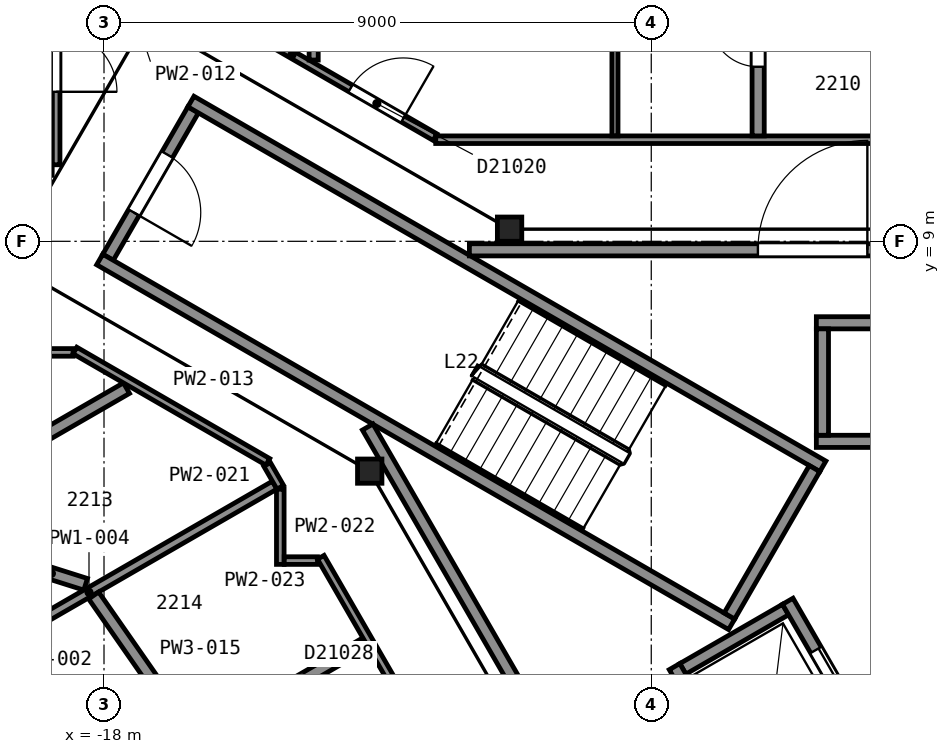
"""IFC4 building model, lengths in metres.
Left out: names, types, materials, properties, quantities, classifications, styles, units other than length and angle.
Written with IfcOpenShell. Run it as: python <this file> out.ifc"""

import sys

from ifc_helpers import new_model, si_unit, direction, frame, frame_2d, origin, origin_2d, place, context, subcontext, project, spatial, rectangle, i_section, extrude, element, fill, save


model = new_model("IFC4")
c1 = context("Model", 3, precision=1e-05, world=origin(), true_north=direction((0.0, 1.0)))
c2 = subcontext(c1, "Body", "Model", "MODEL_VIEW")
j1 = project(units=[si_unit("LENGTHUNIT", "METRE"), si_unit("PLANEANGLEUNIT", "RADIAN")], contexts=[c1])
p1 = place(None, origin())
s1 = spatial("IfcSite", under=j1, at=p1, CompositionType="ELEMENT")
p2 = place(p1, origin())
s2 = spatial("IfcBuilding", under=s1, at=p2, CompositionType="ELEMENT")
p3 = place(p2, frame((0.0, 0.0, 96.4)))
s3 = spatial("IfcBuildingStorey", under=s2, at=p3, CompositionType="ELEMENT", Elevation=96.4)
for number, where, z_axis, x_axis in (
    (1, (-11.33, 9.2, 0.0), (0.0, 0.0, 1.0), (1.0, 0.0, 0.0)),
    (2, (-13.63, 5.22, 0.0), (0.0, 0.0, 1.0), (1.0, 0.0, 0.0)),
):
    element("IfcColumn", number, at=place(p3, frame(where, z_axis=z_axis, x_axis=x_axis)), inside=s3, PredefinedType="COLUMN", context=c2, shape_type="SweptSolid", body=[
        extrude(i_section(OverallWidth=0.401, OverallDepth=0.399, WebThickness=0.025, FlangeThickness=0.04, FilletRadius=0.015, at=origin_2d()), origin(), (0.0, 0.0, 1.0), 3.6),
    ])
p4 = place(p3, frame((-16.534, 11.162, 0.0), z_axis=(0.0, 0.0, 1.0), x_axis=(-0.49998411664, -0.866034573852, 0.0)))
e3 = element("IfcWall", 3, at=p4, inside=s3, PredefinedType="PARTITIONING", context=c2, shape_type="SweptSolid", body=[
    extrude(rectangle(XDim=2.8, YDim=0.2, at=frame_2d((1.4, 0.0))), origin(), (0.0, 0.0, 1.0), 3.35),
])
p5 = place(p4, frame((0.85, 0.0, 0.0)))
e4 = element("IfcOpeningElement", 4, at=p5, cuts=e3, PredefinedType="OPENING", context=c2, shape_type="SweptSolid", body=[
    extrude(rectangle(XDim=1.1, YDim=2.1, at=frame_2d((0.55, 1.05))), frame((0.0, 0.11, 0.0), z_axis=(0.0, -1.0, 0.0), x_axis=(1.0, 0.0, 0.0)), (0.0, 0.0, 1.0), 0.22),
])
for number, where, z_axis, x_axis in (
    (5, (-7.678, 2.701, 0.0), (0.0, 0.0, 1.0), (-0.866, 0.5, 0.0)),
    (6, (-6.178, 5.299, 0.0), (0.0, 0.0, 1.0), (-0.866, 0.5, 0.0)),
):
    element("IfcWall", number, at=place(p3, frame(where, z_axis=z_axis, x_axis=x_axis)), inside=s3, PredefinedType="PARTITIONING", context=c2, shape_type="SweptSolid", body=[
        extrude(rectangle(XDim=12.0, YDim=0.2, at=frame_2d((6.0, 0.0))), origin(), (0.0, 0.0, 1.0), 3.35),
    ])
p6 = place(p3, frame((-6.315, 5.262, 0.0), z_axis=(0.0, 0.0, 1.0), x_axis=(-0.500049511043, -0.865996816683, 0.0)))
e7 = element("IfcWall", 7, at=p6, inside=s3, PredefinedType="PARTITIONING", context=c2, shape_type="SweptSolid", body=[
    extrude(rectangle(XDim=2.8, YDim=0.2, at=frame_2d((1.4, 0.0))), origin(), (0.0, 0.0, 1.0), 3.35),
])
for number, where, z_axis, x_axis in (
    (8, (-6.285, 5.71, 0.0), (0.0, 0.0, 1.0), (1.0, 0.0, 0.0)),
    (9, (-6.285, 7.66, 0.0), (0.0, 0.0, 1.0), (1.0, 0.0, 0.0)),
):
    element("IfcWall", number, at=place(p3, frame(where, z_axis=z_axis, x_axis=x_axis)), inside=s3, PredefinedType="PARTITIONING", context=c2, shape_type="SweptSolid", body=[
        extrude(rectangle(XDim=2.35, YDim=0.2, at=frame_2d((1.175, 0.0))), origin(), (0.0, 0.0, 1.0), 3.6),
    ])
p7 = place(p3, frame((-8.48, 1.969, 0.0), z_axis=(0.0, 0.0, 1.0), x_axis=(0.866000020948, 0.500043961785, 0.0)))
e10 = element("IfcWall", 10, at=p7, inside=s3, PredefinedType="PARTITIONING", context=c2, shape_type="SweptSolid", body=[
    extrude(rectangle(XDim=1.95, YDim=0.2, at=frame_2d((0.975, 0.0))), origin(), (0.0, 0.0, 1.0), 3.6),
])
p8 = place(p3, frame((-6.185, 5.81, 0.0), z_axis=(0.0, 0.0, 1.0), x_axis=(0.0, 1.0, 0.0)))
e11 = element("IfcWall", 11, at=p8, inside=s3, PredefinedType="PARTITIONING", context=c2, shape_type="SweptSolid", body=[
    extrude(rectangle(XDim=1.75, YDim=0.2, at=frame_2d((0.875, 0.0))), origin(), (0.0, 0.0, 1.0), 3.6),
])
p9 = place(p3, frame((-5.28, 0.525, 0.0), z_axis=(0.0, 0.0, 1.0), x_axis=(-0.500037662692, 0.866003658127, 0.0)))
e12 = element("IfcWall", 12, at=p9, inside=s3, PredefinedType="PARTITIONING", context=c2, shape_type="SweptSolid", body=[
    extrude(rectangle(XDim=2.95, YDim=0.2, at=frame_2d((1.475, 0.0))), origin(), (0.0, 0.0, 1.0), 3.6),
])
p10 = place(p9, frame((0.925, 0.0, 0.0)))
e13 = element("IfcOpeningElement", 13, at=p10, cuts=e12, PredefinedType="OPENING", context=c2, shape_type="SweptSolid", body=[
    extrude(rectangle(XDim=1.1, YDim=2.1, at=frame_2d((0.55, 1.05))), frame((0.0, 0.11, 0.0), z_axis=(0.0, -1.0, 0.0), x_axis=(1.0, 0.0, 0.0)), (0.0, 0.0, 1.0), 0.22),
])
p11 = place(p3, frame((-7.242, -0.376, 0.0), z_axis=(0.0, 0.0, 1.0), x_axis=(-0.499996545922, 0.866027397988, 0.0)))
e14 = element("IfcWall", 14, at=p11, inside=s3, PredefinedType="PARTITIONING", context=c2, shape_type="SweptSolid", body=[
    extrude(rectangle(XDim=2.75, YDim=0.2, at=frame_2d((1.375, 0.0))), origin(), (0.0, 0.0, 1.0), 3.6),
])
p12 = place(p3, frame((-13.664, 5.946, 0.0), z_axis=(0.0, 0.0, 1.0), x_axis=(0.499994327219, -0.866028678941, 0.0)))
e15 = element("IfcWall", 15, at=p12, inside=s3, PredefinedType="PARTITIONING", context=c2, shape_type="SweptSolid", body=[
    extrude(rectangle(XDim=23.968, YDim=0.2, at=frame_2d((11.984, 0.0))), origin(), (0.0, 0.0, 1.0), 3.35),
])
p13 = place(p3, frame((0.263, 8.86, 0.0), z_axis=(0.0, 0.0, 1.0), x_axis=(-1.0, 0.0, 0.0)))
e16 = element("IfcWall", 16, at=p13, inside=s3, PredefinedType="PARTITIONING", context=c2, shape_type="SweptSolid", body=[
    extrude(rectangle(XDim=12.254, YDim=0.2, at=frame_2d((6.127, 0.0))), origin(), (0.0, 0.0, 1.0), 3.35),
])
p14 = place(p13, frame((5.709, 0.0, 0.0)))
e17 = element("IfcOpeningElement", 17, at=p14, cuts=e16, PredefinedType="OPENING", context=c2, shape_type="SweptSolid", body=[
    extrude(rectangle(XDim=1.8, YDim=2.1, at=frame_2d((0.9, 1.05))), frame((0.0, 0.11, 0.0), z_axis=(0.0, -1.0, 0.0), x_axis=(1.0, 0.0, 0.0)), (0.0, 0.0, 1.0), 0.22),
])
p15 = place(p3, frame((-21.263, 4.296, 0.0), z_axis=(0.0, 0.0, 1.0), x_axis=(0.95341383314, -0.301665481582, 0.0)))
e18 = element("IfcWall", 18, at=p15, inside=s3, PredefinedType="PARTITIONING", context=c2, shape_type="SweptSolid", body=[
    extrude(rectangle(XDim=3.106, YDim=0.2, at=frame_2d((1.553, 0.0))), origin(), (0.0, 0.0, 1.0), 2.613),
])
p16 = place(p15, frame((1.125, 0.0, 0.0)))
e19 = element("IfcOpeningElement", 19, at=p16, cuts=e18, PredefinedType="OPENING", context=c2, shape_type="SweptSolid", body=[
    extrude(rectangle(XDim=0.8, YDim=2.1, at=frame_2d((0.4, 1.05))), frame((0.0, 0.11, 0.0), z_axis=(0.0, -1.0, 0.0), x_axis=(1.0, 0.0, 0.0)), (0.0, 0.0, 1.0), 0.22),
])
p17 = place(p3, frame((-21.565, 4.314, 0.0), z_axis=(0.0, 0.0, 1.0), x_axis=(0.866058501026, 0.499942669514, 0.0)))
e20 = element("IfcWall", 20, at=p17, inside=s3, PredefinedType="PARTITIONING", context=c2, shape_type="SweptSolid", body=[
    extrude(rectangle(XDim=4.542, YDim=0.2, at=frame_2d((2.271, 0.0))), origin(), (0.0, 0.0, 1.0), 2.613),
])
p18 = place(p3, frame((-21.301, 1.464, 0.0), z_axis=(0.0, 0.0, 1.0), x_axis=(0.866055299146, 0.49994821614, 0.0)))
e21 = element("IfcWall", 21, at=p18, inside=s3, PredefinedType="PARTITIONING", context=c2, shape_type="SweptSolid", body=[
    extrude(rectangle(XDim=7.052, YDim=0.15, at=frame_2d((3.526, 0.0))), origin(), (0.0, 0.0, 1.0), 2.613),
])
p19 = place(p3, frame((-21.022, 7.173, 0.0), z_axis=(0.0, 0.0, 1.0), x_axis=(1.0, 0.0, 0.0)))
e22 = element("IfcWall", 22, at=p19, inside=s3, PredefinedType="PARTITIONING", context=c2, shape_type="SweptSolid", body=[
    extrude(rectangle(XDim=2.513, YDim=0.125, at=frame_2d((1.256, 0.0))), origin(), (0.0, 0.0, 1.0), 2.613),
])
p20 = place(p3, frame((-18.787, 10.259, 0.0), z_axis=(0.0, 0.0, 1.0), x_axis=(0.0, 1.0, 0.0)))
e23 = element("IfcWall", 23, at=p20, inside=s3, PredefinedType="PARTITIONING", context=c2, shape_type="SweptSolid", body=[
    extrude(rectangle(XDim=3.93, YDim=0.125, at=frame_2d((1.965, 0.0))), origin(), (0.0, 0.0, 1.0), 2.613),
])
p21 = place(p20, frame((1.2, 0.0, 0.0)))
e24 = element("IfcOpeningElement", 24, at=p21, cuts=e23, PredefinedType="OPENING", context=c2, shape_type="SweptSolid", body=[
    extrude(rectangle(XDim=1.0, YDim=2.1, at=frame_2d((0.5, 1.05))), frame((0.0, 0.073, 0.0), z_axis=(0.0, -1.0, 0.0), x_axis=(1.0, 0.0, 0.0)), (0.0, 0.0, 1.0), 0.145),
])
p22 = place(p3, frame((-18.478, 7.204, 0.0), z_axis=(0.0, 0.0, 1.0), x_axis=(0.866011320536, -0.500024392108, 0.0)))
e25 = element("IfcWall", 25, at=p22, inside=s3, PredefinedType="PARTITIONING", context=c2, shape_type="SweptSolid", body=[
    extrude(rectangle(XDim=3.663, YDim=0.125, at=frame_2d((1.832, 0.0))), origin(), (0.0, 0.0, 1.0), 2.613),
])
p23 = place(p3, frame((-18.17, 3.175, 0.0), z_axis=(0.0, 0.0, 1.0), x_axis=(0.571541682724, -0.820573034476, 0.0)))
e26 = element("IfcWall", 26, at=p23, inside=s3, PredefinedType="PARTITIONING", context=c2, shape_type="SweptSolid", body=[
    extrude(rectangle(XDim=2.818, YDim=0.2, at=frame_2d((1.409, 0.0))), origin(), (0.0, 0.0, 1.0), 2.613),
])
p24 = place(p3, frame((-16.583, 0.723, 0.0), z_axis=(0.0, 0.0, 1.0), x_axis=(0.866001642064, 0.500041154249, 0.0)))
e27 = element("IfcWall", 27, at=p24, inside=s3, PredefinedType="PARTITIONING", context=c2, shape_type="SweptSolid", body=[
    extrude(rectangle(XDim=3.338, YDim=0.2, at=frame_2d((1.669, 0.0))), origin(), (0.0, 0.0, 1.0), 2.613),
])
p25 = place(p24, frame((1.3, 0.0, 0.0)))
e28 = element("IfcOpeningElement", 28, at=p25, cuts=e27, PredefinedType="OPENING", context=c2, shape_type="SweptSolid", body=[
    extrude(rectangle(XDim=0.9, YDim=2.1, at=frame_2d((0.45, 1.05))), frame((0.0, 0.11, 0.0), z_axis=(0.0, -1.0, 0.0), x_axis=(1.0, 0.0, 0.0)), (0.0, 0.0, 1.0), 0.22),
])
p26 = place(p3, frame((-15.867, 12.625, 0.0), z_axis=(0.0, 0.0, 1.0), x_axis=(0.86603035395, -0.499991425964, 0.0)))
e29 = element("IfcWall", 29, at=p26, inside=s3, PredefinedType="PARTITIONING", context=c2, shape_type="SweptSolid", body=[
    extrude(rectangle(XDim=3.824, YDim=0.125, at=frame_2d((1.912, 0.0))), origin(), (0.0, 0.0, 1.0), 2.613),
])
p27 = place(p26, frame((2.219, 0.0, 0.0)))
e30 = element("IfcOpeningElement", 30, at=p27, cuts=e29, PredefinedType="OPENING", context=c2, shape_type="SweptSolid", body=[
    extrude(rectangle(XDim=1.0, YDim=2.1, at=frame_2d((0.5, 1.05))), frame((0.0, 0.073, 0.0), z_axis=(0.0, -1.0, 0.0), x_axis=(1.0, 0.0, 0.0)), (0.0, 0.0, 1.0), 0.145),
])
p28 = place(p3, frame((-15.318, 5.33, 0.0), z_axis=(0.0, 0.0, 1.0), x_axis=(0.499836277606, -0.86611990832, 0.0)))
e31 = element("IfcWall", 31, at=p28, inside=s3, PredefinedType="PARTITIONING", context=c2, shape_type="SweptSolid", body=[
    extrude(rectangle(XDim=0.433, YDim=0.125, at=frame_2d((0.217, 0.0))), origin(), (0.0, 0.0, 1.0), 2.613),
])
p29 = place(p3, frame((-15.101, 3.687, 0.0), z_axis=(0.0, 0.0, 1.0), x_axis=(0.0, 1.0, 0.0)))
e32 = element("IfcWall", 32, at=p29, inside=s3, PredefinedType="PARTITIONING", context=c2, shape_type="SweptSolid", body=[
    extrude(rectangle(XDim=1.236, YDim=0.125, at=frame_2d((0.618, 0.0))), origin(), (0.0, 0.0, 1.0), 2.613),
])
p30 = place(p3, frame((-15.036, 3.749, 0.0), z_axis=(0.0, 0.0, 1.0), x_axis=(1.0, 0.0, 0.0)))
e33 = element("IfcWall", 33, at=p30, inside=s3, PredefinedType="PARTITIONING", context=c2, shape_type="SweptSolid", body=[
    extrude(rectangle(XDim=0.547, YDim=0.125, at=frame_2d((0.273, 0.0))), origin(), (0.0, 0.0, 1.0), 2.613),
])
p31 = place(p3, frame((-14.552, 11.981, 0.0), z_axis=(0.0, 0.0, 1.0), x_axis=(0.0, 1.0, 0.0)))
e34 = element("IfcWall", 34, at=p31, inside=s3, PredefinedType="PARTITIONING", context=c2, shape_type="SweptSolid", body=[
    extrude(rectangle(XDim=5.734, YDim=0.15, at=frame_2d((2.867, 0.0))), origin(), (0.0, 0.0, 1.0), 2.613),
])
p32 = place(p3, frame((-9.41, -4.902, 0.0), z_axis=(0.0, 0.0, 1.0), x_axis=(-0.499971244726, 0.866042005013, 0.0)))
e35 = element("IfcWall", 35, at=p32, inside=s3, PredefinedType="PARTITIONING", context=c2, shape_type="SweptSolid", body=[
    extrude(rectangle(XDim=10.052, YDim=0.125, at=frame_2d((5.026, 0.0))), origin(), (0.0, 0.0, 1.0), 2.613),
])
p33 = place(p32, frame((6.608, 0.0, 0.0)))
e36 = element("IfcOpeningElement", 36, at=p33, cuts=e35, PredefinedType="OPENING", context=c2, shape_type="SweptSolid", body=[
    extrude(rectangle(XDim=1.0, YDim=2.1, at=frame_2d((0.5, 1.05))), frame((0.0, 0.073, 0.0), z_axis=(0.0, -1.0, 0.0), x_axis=(1.0, 0.0, 0.0)), (0.0, 0.0, 1.0), 0.145),
])
p34 = place(p32, frame((2.989, 0.0, 0.0)))
e37 = element("IfcOpeningElement", 37, at=p34, cuts=e35, PredefinedType="OPENING", context=c2, shape_type="SweptSolid", body=[
    extrude(rectangle(XDim=1.0, YDim=2.1, at=frame_2d((0.5, 1.05))), frame((0.0, 0.073, 0.0), z_axis=(0.0, -1.0, 0.0), x_axis=(1.0, 0.0, 0.0)), (0.0, 0.0, 1.0), 0.145),
])
p35 = place(p3, frame((-12.544, 10.671, 0.0), z_axis=(0.0, 0.0, 1.0), x_axis=(1.0, 0.0, 0.0)))
e38 = element("IfcWall", 38, at=p35, inside=s3, PredefinedType="PARTITIONING", context=c2, shape_type="SweptSolid", body=[
    extrude(rectangle(XDim=25.089, YDim=0.125, at=frame_2d((12.544, 0.0))), origin(), (0.0, 0.0, 1.0), 2.613),
])
p36 = place(p35, frame((18.962, 0.0, 0.0)))
e39 = element("IfcOpeningElement", 39, at=p36, cuts=e38, PredefinedType="OPENING", context=c2, shape_type="SweptSolid", body=[
    extrude(rectangle(XDim=0.9, YDim=2.1, at=frame_2d((0.45, 1.05))), frame((0.0, 0.073, 0.0), z_axis=(0.0, -1.0, 0.0), x_axis=(1.0, 0.0, 0.0)), (0.0, 0.0, 1.0), 0.145),
])
p37 = place(p35, frame((14.857, 0.0, 0.0)))
e40 = element("IfcOpeningElement", 40, at=p37, cuts=e38, PredefinedType="OPENING", context=c2, shape_type="SweptSolid", body=[
    extrude(rectangle(XDim=1.0, YDim=2.1, at=frame_2d((0.5, 1.05))), frame((0.0, 0.073, 0.0), z_axis=(0.0, -1.0, 0.0), x_axis=(1.0, 0.0, 0.0)), (0.0, 0.0, 1.0), 0.145),
])
p38 = place(p3, frame((-9.597, 17.715, 0.0), z_axis=(0.0, 0.0, 1.0), x_axis=(0.0, -1.0, 0.0)))
e41 = element("IfcWall", 41, at=p38, inside=s3, PredefinedType="PARTITIONING", context=c2, shape_type="SweptSolid", body=[
    extrude(rectangle(XDim=6.982, YDim=0.1, at=frame_2d((3.491, 0.0))), origin(), (0.0, 0.0, 1.0), 2.613),
])
p39 = place(p38, frame((3.094, 0.0, 0.0)))
e42 = element("IfcOpeningElement", 42, at=p39, cuts=e41, PredefinedType="OPENING", context=c2, shape_type="SweptSolid", body=[
    extrude(rectangle(XDim=0.9, YDim=2.1, at=frame_2d((0.45, 1.05))), frame((0.0, 0.06, 0.0), z_axis=(0.0, -1.0, 0.0), x_axis=(1.0, 0.0, 0.0)), (0.0, 0.0, 1.0), 0.12),
])
p40 = place(p3, frame((-7.242, 13.971, 0.0), z_axis=(0.0, 0.0, 1.0), x_axis=(0.0, -1.0, 0.0)))
e43 = element("IfcWall", 43, at=p40, inside=s3, PredefinedType="PARTITIONING", context=c2, shape_type="SweptSolid", body=[
    extrude(rectangle(XDim=3.238, YDim=0.2, at=frame_2d((1.619, 0.0))), origin(), (0.0, 0.0, 1.0), 2.613),
])
p41 = place(p40, frame((1.3, 0.0, 0.0)))
e44 = element("IfcOpeningElement", 44, at=p41, cuts=e43, PredefinedType="OPENING", context=c2, shape_type="SweptSolid", body=[
    extrude(rectangle(XDim=0.8, YDim=2.1, at=frame_2d((0.4, 1.05))), frame((0.0, 0.11, 0.0), z_axis=(0.0, -1.0, 0.0), x_axis=(1.0, 0.0, 0.0)), (0.0, 0.0, 1.0), 0.22),
])
p42 = place(p5, origin())
e45 = element("IfcDoor", 45, at=p42, inside=s3, OperationType="SINGLE_SWING_RIGHT", PredefinedType="DOOR", context=c2, shape_type="SweptSolid", body=[
    extrude(rectangle(XDim=1.1, YDim=2.1, at=frame_2d((0.55, 1.05))), frame((0.0, 0.025, 0.0), z_axis=(0.0, -1.0, 0.0), x_axis=(1.0, 0.0, 0.0)), (0.0, 0.0, 1.0), 0.05),
])
fill(e4, e45)
p43 = place(p10, origin())
e46 = element("IfcDoor", 46, at=p43, inside=s3, OperationType="SLIDING_TO_LEFT", PredefinedType="DOOR", context=c2, shape_type="SweptSolid", body=[
    extrude(rectangle(XDim=1.1, YDim=2.1, at=frame_2d((0.55, 1.05))), frame((0.0, 0.025, 0.0), z_axis=(0.0, -1.0, 0.0), x_axis=(1.0, 0.0, 0.0)), (0.0, 0.0, 1.0), 0.05),
])
fill(e13, e46)
p44 = place(p14, origin())
e47 = element("IfcDoor", 47, at=p44, inside=s3, OperationType="DOUBLE_DOOR_SINGLE_SWING", PredefinedType="DOOR", context=c2, shape_type="SweptSolid", body=[
    extrude(rectangle(XDim=1.8, YDim=2.1, at=frame_2d((0.9, 1.05))), frame((0.0, 0.025, 0.0), z_axis=(0.0, -1.0, 0.0), x_axis=(1.0, 0.0, 0.0)), (0.0, 0.0, 1.0), 0.05),
])
fill(e17, e47)
p45 = place(p21, origin())
e48 = element("IfcDoor", 48, at=p45, inside=s3, OperationType="SINGLE_SWING_LEFT", PredefinedType="DOOR", context=c2, shape_type="SweptSolid", body=[
    extrude(rectangle(XDim=1.0, YDim=2.1, at=frame_2d((0.5, 1.05))), frame((0.0, 0.025, 0.0), z_axis=(0.0, -1.0, 0.0), x_axis=(1.0, 0.0, 0.0)), (0.0, 0.0, 1.0), 0.05),
])
fill(e24, e48)
p46 = place(p27, origin())
e49 = element("IfcDoor", 49, at=p46, inside=s3, OperationType="SINGLE_SWING_RIGHT", PredefinedType="DOOR", context=c2, shape_type="SweptSolid", body=[
    extrude(rectangle(XDim=1.0, YDim=2.1, at=frame_2d((0.5, 1.05))), frame((0.0, 0.025, 0.0), z_axis=(0.0, -1.0, 0.0), x_axis=(1.0, 0.0, 0.0)), (0.0, 0.0, 1.0), 0.05),
])
fill(e30, e49)
p47 = place(p41, origin())
e50 = element("IfcDoor", 50, at=p47, inside=s3, OperationType="SINGLE_SWING_LEFT", PredefinedType="DOOR", context=c2, shape_type="SweptSolid", body=[
    extrude(rectangle(XDim=0.8, YDim=2.1, at=frame_2d((0.4, 1.05))), frame((0.0, 0.025, 0.0), z_axis=(0.0, -1.0, 0.0), x_axis=(1.0, 0.0, 0.0)), (0.0, 0.0, 1.0), 0.05),
])
fill(e44, e50)
save(model, sys.argv[1])
